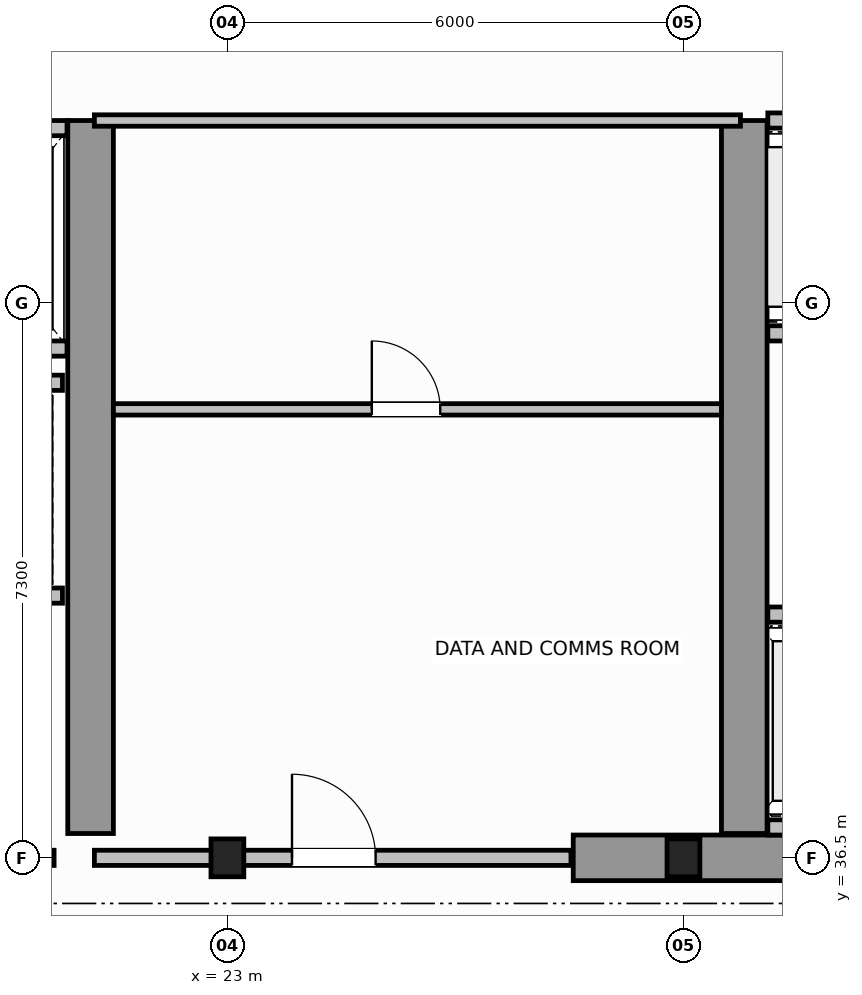
"""IFC4 building model, lengths in metres.
Left out: names, types, materials, properties, quantities, classifications, styles, units other than length and angle.
Written with IfcOpenShell. Run it as: python <this file> out.ifc"""

import sys

from ifc_helpers import new_model, si_unit, direction, frame, frame_2d, origin, origin_2d, place, context, subcontext, project, spatial, rectangle, i_section, extrude, source, transform, mapped, element, fill, save


model = new_model("IFC4")
c1 = context("Model", 3, precision=1e-05, world=origin(), true_north=direction((0.0, 1.0)))
c2 = subcontext(c1, "Body", "Model", "MODEL_VIEW")
j1 = project(units=[si_unit("LENGTHUNIT", "METRE"), si_unit("PLANEANGLEUNIT", "RADIAN")], contexts=[c1])
p1 = place(None, origin())
s1 = spatial("IfcSite", under=j1, at=p1, CompositionType="ELEMENT")
p2 = place(p1, origin())
s2 = spatial("IfcBuilding", under=s1, at=p2, CompositionType="ELEMENT")
p3 = place(p2, frame((0.0, 0.0, 188.0)))
s3 = spatial("IfcBuildingStorey", under=s2, at=p3, CompositionType="ELEMENT", Elevation=188.0)
m1 = source(origin(), c2, "Body", "SweptSolid", [
    extrude(i_section(OverallWidth=0.432, OverallDepth=0.498, WebThickness=0.055, FlangeThickness=0.068, FilletRadius=0.015, at=origin_2d()), origin(), (0.0, 0.0, 1.0), 3.8),
])
for number, where, z_axis, x_axis in (
    (1, (23.0, 36.5, 0.0), (0.0, 0.0, 1.0), (1.0, 0.0, 0.0)),
    (2, (29.0, 36.5, 0.0), (0.0, 0.0, 1.0), (1.0, 0.0, 0.0)),
):
    element("IfcColumn", number, at=place(p3, frame(where, z_axis=z_axis, x_axis=x_axis)), inside=s3, PredefinedType="COLUMN", context=c2, shape_type="MappedRepresentation", body=[
        mapped(m1, transform((0.0, 0.0, 0.0), scale=1.0)),
    ])
p4 = place(p3, frame((27.55, 36.5, 0.0), z_axis=(0.0, 0.0, 1.0), x_axis=(1.0, 0.0, 0.0)))
e3 = element("IfcWall", 3, at=p4, inside=s3, PredefinedType="SHEAR", context=c2, shape_type="SweptSolid", body=[
    extrude(rectangle(XDim=4.5, YDim=0.6, at=frame_2d((2.25, 0.0))), origin(), (0.0, 0.0, 1.0), 3.8),
])
for number, where, z_axis, x_axis in (
    (4, (21.2, 36.82, 0.0), (0.0, 0.0, 1.0), (0.0, 1.0, 0.0)),
    (5, (29.8, 36.82, 0.0), (0.0, 0.0, 1.0), (0.0, 1.0, 0.0)),
):
    element("IfcWall", number, at=place(p3, frame(where, z_axis=z_axis, x_axis=x_axis)), inside=s3, PredefinedType="SHEAR", context=c2, shape_type="SweptSolid", body=[
        extrude(rectangle(XDim=9.38, YDim=0.6, at=frame_2d((4.69, 0.0))), origin(), (0.0, 0.0, 1.0), 3.8),
    ])
p5 = place(p3, frame((18.25, 36.5, 0.0), z_axis=(0.0, 0.0, 1.0), x_axis=(1.0, 0.0, 0.0)))
e6 = element("IfcWall", 6, at=p5, inside=s3, PredefinedType="SOLIDWALL", context=c2, shape_type="SweptSolid", body=[
    extrude(rectangle(XDim=2.47, YDim=0.2, at=frame_2d((1.235, 0.0))), origin(), (0.0, 0.0, 1.0), 2.57),
])
p6 = place(p5, frame((0.65, 0.0, 0.0)))
e7 = element("IfcOpeningElement", 7, at=p6, cuts=e6, PredefinedType="OPENING", context=c2, shape_type="SweptSolid", body=[
    extrude(rectangle(XDim=1.1, YDim=2.15, at=frame_2d((0.55, 1.075))), frame((0.0, 0.11, 0.0), z_axis=(0.0, -1.0, 0.0), x_axis=(1.0, 0.0, 0.0)), (0.0, 0.0, 1.0), 0.22),
])
p7 = place(p3, frame((30.11, 39.7, 0.0), z_axis=(0.0, 0.0, 1.0), x_axis=(1.0, 0.0, 0.0)))
e8 = element("IfcWall", 8, at=p7, inside=s3, PredefinedType="SOLIDWALL", context=c2, shape_type="SweptSolid", body=[
    extrude(rectangle(XDim=1.92, YDim=0.2, at=frame_2d((0.96, 0.0))), origin(), (0.0, 0.0, 1.0), 3.58),
])
p8 = place(p7, frame((0.41, 0.0, 0.0)))
e9 = element("IfcOpeningElement", 9, at=p8, cuts=e8, PredefinedType="OPENING", context=c2, shape_type="SweptSolid", body=[
    extrude(rectangle(XDim=1.1, YDim=2.15, at=frame_2d((0.55, 1.075))), frame((0.0, 0.11, 0.0), z_axis=(0.0, -1.0, 0.0), x_axis=(1.0, 0.0, 0.0)), (0.0, 0.0, 1.0), 0.22),
])
p9 = place(p3, frame((30.11, 36.9, 0.0), z_axis=(0.0, 0.0, 1.0), x_axis=(1.0, 0.0, 0.0)))
e10 = element("IfcWall", 10, at=p9, inside=s3, PredefinedType="SOLIDWALL", context=c2, shape_type="SweptSolid", body=[
    extrude(rectangle(XDim=1.92, YDim=0.2, at=frame_2d((0.96, 0.0))), origin(), (0.0, 0.0, 1.0), 3.58),
])
p10 = place(p3, frame((30.11, 43.4, 0.0), z_axis=(0.0, 0.0, 1.0), x_axis=(1.0, 0.0, 0.0)))
e11 = element("IfcWall", 11, at=p10, inside=s3, PredefinedType="SOLIDWALL", context=c2, shape_type="SweptSolid", body=[
    extrude(rectangle(XDim=1.8, YDim=0.2, at=frame_2d((0.9, 0.0))), origin(), (0.0, 0.0, 1.0), 3.58),
])
p11 = place(p10, frame((0.35, 0.0, 0.0)))
e12 = element("IfcOpeningElement", 12, at=p11, cuts=e11, PredefinedType="OPENING", context=c2, shape_type="SweptSolid", body=[
    extrude(rectangle(XDim=1.1, YDim=2.15, at=frame_2d((0.55, 1.075))), frame((0.0, 0.11, 0.0), z_axis=(0.0, -1.0, 0.0), x_axis=(1.0, 0.0, 0.0)), (0.0, 0.0, 1.0), 0.22),
])
p12 = place(p3, frame((30.11, 46.2, 0.0), z_axis=(0.0, 0.0, 1.0), x_axis=(1.0, 0.0, 0.0)))
e13 = element("IfcWall", 13, at=p12, inside=s3, PredefinedType="SOLIDWALL", context=c2, shape_type="SweptSolid", body=[
    extrude(rectangle(XDim=1.8, YDim=0.2, at=frame_2d((0.9, 0.0))), origin(), (0.0, 0.0, 1.0), 3.58),
])
p13 = place(p3, frame((18.67, 46.1, 0.0), z_axis=(0.0, 0.0, 1.0), x_axis=(1.0, 0.0, 0.0)))
e14 = element("IfcWall", 14, at=p13, inside=s3, PredefinedType="SOLIDWALL", context=c2, shape_type="SweptSolid", body=[
    extrude(rectangle(XDim=2.22, YDim=0.2, at=frame_2d((1.11, 0.0))), origin(), (0.0, 0.0, 1.0), 3.58),
])
p14 = place(p13, frame((0.56, 0.0, 0.0)))
e15 = element("IfcOpeningElement", 15, at=p14, cuts=e14, PredefinedType="OPENING", context=c2, shape_type="SweptSolid", body=[
    extrude(rectangle(XDim=1.1, YDim=2.15, at=frame_2d((0.55, 1.075))), frame((0.0, 0.11, 0.0), z_axis=(0.0, -1.0, 0.0), x_axis=(1.0, 0.0, 0.0)), (0.0, 0.0, 1.0), 0.22),
])
p15 = place(p3, frame((18.67, 43.2, 0.0), z_axis=(0.0, 0.0, 1.0), x_axis=(1.0, 0.0, 0.0)))
e16 = element("IfcWall", 16, at=p15, inside=s3, PredefinedType="SOLIDWALL", context=c2, shape_type="SweptSolid", body=[
    extrude(rectangle(XDim=2.22, YDim=0.2, at=frame_2d((1.11, 0.0))), origin(), (0.0, 0.0, 1.0), 3.58),
])
p16 = place(p3, frame((18.67, 39.95, 0.0), z_axis=(0.0, 0.0, 1.0), x_axis=(1.0, 0.0, 0.0)))
e17 = element("IfcWall", 17, at=p16, inside=s3, PredefinedType="SOLIDWALL", context=c2, shape_type="SweptSolid", body=[
    extrude(rectangle(XDim=2.16, YDim=0.2, at=frame_2d((1.08, 0.0))), origin(), (0.0, 0.0, 1.0), 3.58),
])
p17 = place(p16, frame((0.53, 0.0, 0.0)))
e18 = element("IfcOpeningElement", 18, at=p17, cuts=e17, PredefinedType="OPENING", context=c2, shape_type="SweptSolid", body=[
    extrude(rectangle(XDim=1.1, YDim=2.15, at=frame_2d((0.55, 1.075))), frame((0.0, 0.11, 0.0), z_axis=(0.0, -1.0, 0.0), x_axis=(1.0, 0.0, 0.0)), (0.0, 0.0, 1.0), 0.22),
])
p18 = place(p3, frame((18.67, 42.75, 0.0), z_axis=(0.0, 0.0, 1.0), x_axis=(1.0, 0.0, 0.0)))
e19 = element("IfcWall", 19, at=p18, inside=s3, PredefinedType="SOLIDWALL", context=c2, shape_type="SweptSolid", body=[
    extrude(rectangle(XDim=2.16, YDim=0.2, at=frame_2d((1.08, 0.0))), origin(), (0.0, 0.0, 1.0), 3.58),
])
p19 = place(p3, frame((21.25, 36.5, 0.0), z_axis=(0.0, 0.0, 1.0), x_axis=(1.0, 0.0, 0.0)))
e20 = element("IfcWall", 20, at=p19, inside=s3, PredefinedType="SOLIDWALL", context=c2, shape_type="SweptSolid", body=[
    extrude(rectangle(XDim=6.27, YDim=0.2, at=frame_2d((3.135, 0.0))), origin(), (0.0, 0.0, 1.0), 2.57),
])
p20 = place(p19, frame((2.6, 0.0, 0.0)))
e21 = element("IfcOpeningElement", 21, at=p20, cuts=e20, PredefinedType="OPENING", context=c2, shape_type="SweptSolid", body=[
    extrude(rectangle(XDim=1.1, YDim=2.15, at=frame_2d((0.55, 1.075))), frame((0.0, 0.11, 0.0), z_axis=(0.0, -1.0, 0.0), x_axis=(1.0, 0.0, 0.0)), (0.0, 0.0, 1.0), 0.22),
])
p21 = place(p3, frame((21.25, 46.2, 0.0), z_axis=(0.0, 0.0, 1.0), x_axis=(1.0, 0.0, 0.0)))
e22 = element("IfcWall", 22, at=p21, inside=s3, PredefinedType="PARTITIONING", context=c2, shape_type="SweptSolid", body=[
    extrude(rectangle(XDim=8.5, YDim=0.15, at=frame_2d((4.25, 0.0))), origin(), (0.0, 0.0, 1.0), 3.58),
])
p22 = place(p3, frame((21.5, 42.4, 0.0), z_axis=(0.0, 0.0, 1.0), x_axis=(1.0, 0.0, 0.0)))
e23 = element("IfcWall", 23, at=p22, inside=s3, PredefinedType="PARTITIONING", context=c2, shape_type="SweptSolid", body=[
    extrude(rectangle(XDim=8.0, YDim=0.15, at=frame_2d((4.0, 0.0))), origin(), (0.0, 0.0, 1.0), 3.58),
])
p23 = place(p22, frame((3.4, 0.0, 0.0)))
e24 = element("IfcOpeningElement", 24, at=p23, cuts=e23, PredefinedType="OPENING", context=c2, shape_type="SweptSolid", body=[
    extrude(rectangle(XDim=0.9, YDim=2.1, at=frame_2d((0.45, 1.05))), frame((0.0, 0.085, 0.0), z_axis=(0.0, -1.0, 0.0), x_axis=(1.0, 0.0, 0.0)), (0.0, 0.0, 1.0), 0.17),
])
m2 = source(origin(), c2, "Body", "SweptSolid", [
    extrude(rectangle(XDim=1.1, YDim=2.15, at=frame_2d((0.55, 1.075))), frame((0.0, 0.025, 0.0), z_axis=(0.0, -1.0, 0.0), x_axis=(1.0, 0.0, 0.0)), (0.0, 0.0, 1.0), 0.05),
])
p24 = place(p20, origin())
e25 = element("IfcDoor", 25, at=p24, inside=s3, OperationType="SINGLE_SWING_LEFT", PredefinedType="DOOR", context=c2, shape_type="MappedRepresentation", body=[
    mapped(m2, transform((0.0, 0.0, 0.0), scale=1.0)),
])
fill(e21, e25)
m3 = source(origin(), c2, "Body", "SweptSolid", [
    extrude(rectangle(XDim=0.9, YDim=2.1, at=frame_2d((0.45, 1.05))), frame((0.0, 0.025, 0.0), z_axis=(0.0, -1.0, 0.0), x_axis=(1.0, 0.0, 0.0)), (0.0, 0.0, 1.0), 0.05),
])
p25 = place(p23, origin())
e26 = element("IfcDoor", 26, at=p25, inside=s3, OperationType="SINGLE_SWING_RIGHT", PredefinedType="DOOR", context=c2, shape_type="MappedRepresentation", body=[
    mapped(m3, transform((0.0, 0.0, 0.0), scale=1.0)),
])
fill(e24, e26)
save(model, sys.argv[1])
